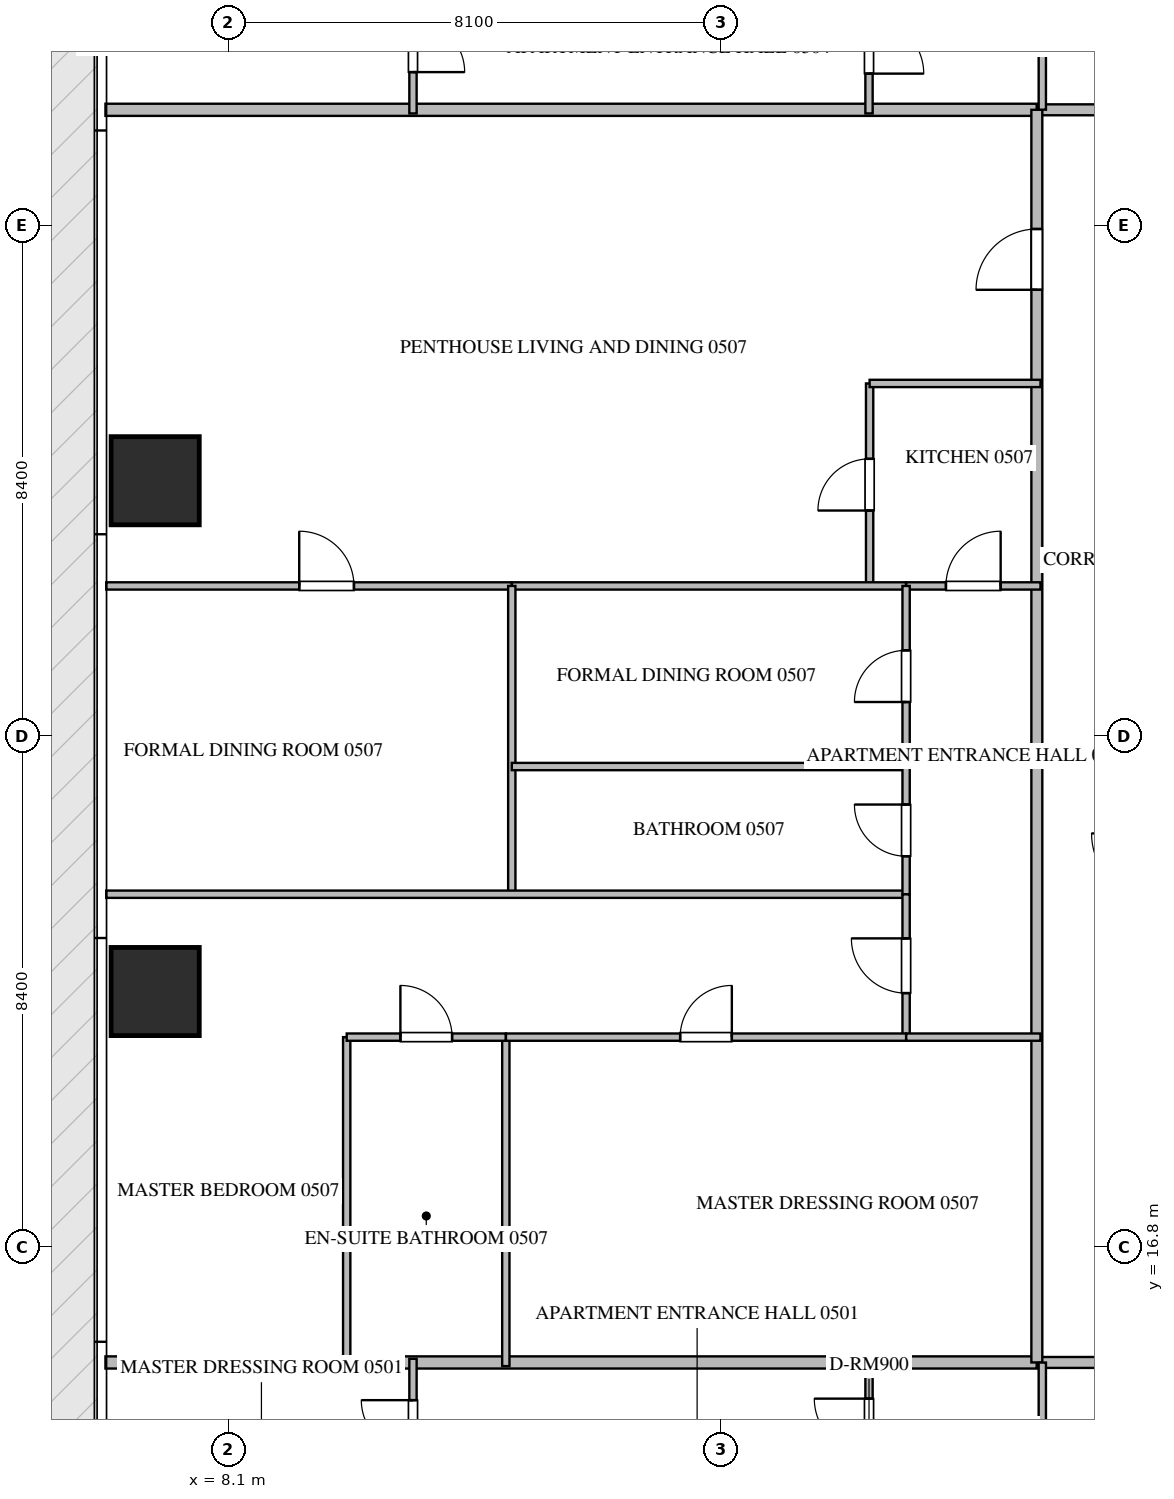
"""IFC4 building model, lengths in metres.
Left out: names, types, materials, properties, quantities, classifications, styles, units other than length and angle.
Written with IfcOpenShell. Run it as: python <this file> out.ifc"""

import sys

from ifc_helpers import new_model, si_unit, direction, frame, frame_2d, origin, origin_2d, place, context, subcontext, project, spatial, rectangle, extrude, source, transform, mapped, element, fill, save


model = new_model("IFC4")
c1 = context("Model", 3, precision=1e-05, world=origin(), true_north=direction((0.0, 1.0)))
c2 = subcontext(c1, "Body", "Model", "MODEL_VIEW")
j1 = project(units=[si_unit("LENGTHUNIT", "METRE"), si_unit("PLANEANGLEUNIT", "RADIAN")], contexts=[c1])
p1 = place(None, origin())
s1 = spatial("IfcSite", under=j1, at=p1, CompositionType="ELEMENT")
p2 = place(p1, origin())
s2 = spatial("IfcBuilding", under=s1, at=p2, CompositionType="ELEMENT")
p3 = place(p2, frame((0.0, 0.0, 26.7)))
s3 = spatial("IfcBuildingStorey", under=s2, at=p3, CompositionType="ELEMENT", Elevation=26.7)
m1 = source(origin(), c2, "Body", "SweptSolid", [
    extrude(rectangle(XDim=1.45, YDim=1.45, at=origin_2d()), origin(), (0.0, 0.0, 1.0), 3.93),
])
for number, where, z_axis, x_axis in (
    (1, (6.9, 21.0, -0.44), (0.0, 0.0, 1.0), (1.0, 0.0, 0.0)),
    (2, (6.9, 29.4, -0.44), (0.0, 0.0, 1.0), (1.0, 0.0, 0.0)),
):
    element("IfcColumn", number, at=place(p3, frame(where, z_axis=z_axis, x_axis=x_axis)), inside=s3, PredefinedType="COLUMN", context=c2, shape_type="MappedRepresentation", body=[
        mapped(m1, transform((0.0, 0.0, 0.0), scale=1.0)),
    ])
for number, where, z_axis, x_axis in (
    (3, (6.082, 14.9, 0.0), (0.0, 0.0, 1.0), (1.0, 0.0, 0.0)),
    (4, (6.082, 35.5, 0.0), (0.0, 0.0, 1.0), (1.0, 0.0, 0.0)),
):
    element("IfcWall", number, at=place(p3, frame(where, z_axis=z_axis, x_axis=x_axis)), inside=s3, PredefinedType="PARTITIONING", context=c2, shape_type="SweptSolid", body=[
        extrude(rectangle(XDim=15.318, YDim=0.2, at=frame_2d((7.659, 0.0))), origin(), (0.0, 0.0, 1.0), 3.49),
    ])
p4 = place(p3, frame((21.402, 14.9, 0.0), z_axis=(0.0, 0.0, 1.0), x_axis=(1.0, 0.0, 0.0)))
e5 = element("IfcWall", 5, at=p4, inside=s3, PredefinedType="PARTITIONING", context=c2, shape_type="SweptSolid", body=[
    extrude(rectangle(XDim=21.996, YDim=0.18, at=frame_2d((10.998, 0.0))), origin(), (0.0, 0.0, 1.0), 3.49),
])
p5 = place(p4, frame((2.1, 0.0, 0.0)))
e6 = element("IfcOpeningElement", 6, at=p5, cuts=e5, PredefinedType="OPENING", context=c2, shape_type="SweptSolid", body=[
    extrude(rectangle(XDim=1.0, YDim=2.15, at=frame_2d((0.5, 1.075))), frame((0.0, 0.1, 0.0), z_axis=(0.0, -1.0, 0.0), x_axis=(1.0, 0.0, 0.0)), (0.0, 0.0, 1.0), 0.2),
])
p6 = place(p4, frame((6.719, 0.0, 0.0)))
e7 = element("IfcOpeningElement", 7, at=p6, cuts=e5, PredefinedType="OPENING", context=c2, shape_type="SweptSolid", body=[
    extrude(rectangle(XDim=1.0, YDim=2.15, at=frame_2d((0.5, 1.075))), frame((0.0, 0.1, 0.0), z_axis=(0.0, -1.0, 0.0), x_axis=(1.0, 0.0, 0.0)), (0.0, 0.0, 1.0), 0.2),
])
p7 = place(p4, frame((18.896, 0.0, 0.0)))
e8 = element("IfcOpeningElement", 8, at=p7, cuts=e5, PredefinedType="OPENING", context=c2, shape_type="SweptSolid", body=[
    extrude(rectangle(XDim=1.0, YDim=2.15, at=frame_2d((0.5, 1.075))), frame((0.0, 0.1, 0.0), z_axis=(0.0, -1.0, 0.0), x_axis=(1.0, 0.0, 0.0)), (0.0, 0.0, 1.0), 0.2),
])
p8 = place(p3, frame((21.402, 35.5, 0.0), z_axis=(0.0, 0.0, 1.0), x_axis=(1.0, 0.0, 0.0)))
e9 = element("IfcWall", 9, at=p8, inside=s3, PredefinedType="PARTITIONING", context=c2, shape_type="SweptSolid", body=[
    extrude(rectangle(XDim=21.996, YDim=0.18, at=frame_2d((10.998, 0.0))), origin(), (0.0, 0.0, 1.0), 3.49),
])
p9 = place(p8, frame((2.1, 0.0, 0.0)))
e10 = element("IfcOpeningElement", 10, at=p9, cuts=e9, PredefinedType="OPENING", context=c2, shape_type="SweptSolid", body=[
    extrude(rectangle(XDim=1.0, YDim=2.15, at=frame_2d((0.5, 1.075))), frame((0.0, 0.1, 0.0), z_axis=(0.0, -1.0, 0.0), x_axis=(1.0, 0.0, 0.0)), (0.0, 0.0, 1.0), 0.2),
])
p10 = place(p8, frame((14.277, 0.0, 0.0)))
e11 = element("IfcOpeningElement", 11, at=p10, cuts=e9, PredefinedType="OPENING", context=c2, shape_type="SweptSolid", body=[
    extrude(rectangle(XDim=1.0, YDim=2.15, at=frame_2d((0.5, 1.075))), frame((0.0, 0.1, 0.0), z_axis=(0.0, -1.0, 0.0), x_axis=(1.0, 0.0, 0.0)), (0.0, 0.0, 1.0), 0.2),
])
p11 = place(p8, frame((18.896, 0.0, 0.0)))
e12 = element("IfcOpeningElement", 12, at=p11, cuts=e9, PredefinedType="OPENING", context=c2, shape_type="SweptSolid", body=[
    extrude(rectangle(XDim=1.0, YDim=2.15, at=frame_2d((0.5, 1.075))), frame((0.0, 0.1, 0.0), z_axis=(0.0, -1.0, 0.0), x_axis=(1.0, 0.0, 0.0)), (0.0, 0.0, 1.0), 0.2),
])
p12 = place(p3, frame((21.4, 14.9, 0.0), z_axis=(0.0, 0.0, 1.0), x_axis=(0.0, 1.0, 0.0)))
e13 = element("IfcWall", 13, at=p12, inside=s3, PredefinedType="PARTITIONING", context=c2, shape_type="SweptSolid", body=[
    extrude(rectangle(XDim=20.6, YDim=0.18, at=frame_2d((10.3, 0.0))), origin(), (0.0, 0.0, 1.0), 3.49),
])
p13 = place(p12, frame((17.64, 0.0, 0.0)))
e14 = element("IfcOpeningElement", 14, at=p13, cuts=e13, PredefinedType="OPENING", context=c2, shape_type="SweptSolid", body=[
    extrude(rectangle(XDim=1.0, YDim=2.15, at=frame_2d((0.5, 1.075))), frame((0.0, 0.1, 0.0), z_axis=(0.0, -1.0, 0.0), x_axis=(1.0, 0.0, 0.0)), (0.0, 0.0, 1.0), 0.2),
])
p14 = place(p3, frame((21.49, 12.15, 0.0), z_axis=(0.0, 0.0, 1.0), x_axis=(0.0, 1.0, 0.0)))
e15 = element("IfcWall", 15, at=p14, inside=s3, PredefinedType="PARTITIONING", context=c2, shape_type="SweptSolid", body=[
    extrude(rectangle(XDim=2.748, YDim=0.12, at=frame_2d((1.374, 0.0))), origin(), (0.0, 0.0, 1.0), 3.49),
])
p15 = place(p3, frame((18.64, 12.75, 0.0), z_axis=(0.0, 0.0, 1.0), x_axis=(0.0, 1.0, 0.0)))
e16 = element("IfcWall", 16, at=p15, inside=s3, PredefinedType="PARTITIONING", context=c2, shape_type="SweptSolid", body=[
    extrude(rectangle(XDim=2.21, YDim=0.12, at=frame_2d((1.105, 0.0))), origin(), (0.0, 0.0, 1.0), 3.49),
])
p16 = place(p15, frame((0.655, 0.0, 0.0)))
e17 = element("IfcOpeningElement", 17, at=p16, cuts=e16, PredefinedType="OPENING", context=c2, shape_type="SweptSolid", body=[
    extrude(rectangle(XDim=0.9, YDim=2.1, at=frame_2d((0.45, 1.05))), frame((0.0, 0.07, 0.0), z_axis=(0.0, -1.0, 0.0), x_axis=(1.0, 0.0, 0.0)), (0.0, 0.0, 1.0), 0.14),
])
p17 = place(p3, frame((11.14, 12.75, 0.0), z_axis=(0.0, 0.0, 1.0), x_axis=(0.0, 1.0, 0.0)))
e18 = element("IfcWall", 18, at=p17, inside=s3, PredefinedType="PARTITIONING", context=c2, shape_type="SweptSolid", body=[
    extrude(rectangle(XDim=2.21, YDim=0.12, at=frame_2d((1.105, 0.0))), origin(), (0.0, 0.0, 1.0), 3.49),
])
p18 = place(p17, frame((0.68, 0.0, 0.0)))
e19 = element("IfcOpeningElement", 19, at=p18, cuts=e18, PredefinedType="OPENING", context=c2, shape_type="SweptSolid", body=[
    extrude(rectangle(XDim=0.85, YDim=2.1, at=frame_2d((0.425, 1.05))), frame((0.0, 0.07, 0.0), z_axis=(0.0, -1.0, 0.0), x_axis=(1.0, 0.0, 0.0)), (0.0, 0.0, 1.0), 0.14),
])
p19 = place(p3, frame((21.49, 38.25, 0.0), z_axis=(0.0, 0.0, 1.0), x_axis=(0.0, -1.0, 0.0)))
e20 = element("IfcWall", 20, at=p19, inside=s3, PredefinedType="PARTITIONING", context=c2, shape_type="SweptSolid", body=[
    extrude(rectangle(XDim=2.748, YDim=0.12, at=frame_2d((1.374, 0.0))), origin(), (0.0, 0.0, 1.0), 3.49),
])
p20 = place(p3, frame((18.64, 37.65, 0.0), z_axis=(0.0, 0.0, 1.0), x_axis=(0.0, -1.0, 0.0)))
e21 = element("IfcWall", 21, at=p20, inside=s3, PredefinedType="PARTITIONING", context=c2, shape_type="SweptSolid", body=[
    extrude(rectangle(XDim=2.21, YDim=0.12, at=frame_2d((1.105, 0.0))), origin(), (0.0, 0.0, 1.0), 3.49),
])
p21 = place(p20, frame((0.655, 0.0, 0.0)))
e22 = element("IfcOpeningElement", 22, at=p21, cuts=e21, PredefinedType="OPENING", context=c2, shape_type="SweptSolid", body=[
    extrude(rectangle(XDim=0.9, YDim=2.1, at=frame_2d((0.45, 1.05))), frame((0.0, 0.07, 0.0), z_axis=(0.0, -1.0, 0.0), x_axis=(1.0, 0.0, 0.0)), (0.0, 0.0, 1.0), 0.14),
])
p22 = place(p3, frame((11.14, 37.65, 0.0), z_axis=(0.0, 0.0, 1.0), x_axis=(0.0, -1.0, 0.0)))
e23 = element("IfcWall", 23, at=p22, inside=s3, PredefinedType="PARTITIONING", context=c2, shape_type="SweptSolid", body=[
    extrude(rectangle(XDim=2.21, YDim=0.12, at=frame_2d((1.105, 0.0))), origin(), (0.0, 0.0, 1.0), 3.49),
])
p23 = place(p22, frame((0.68, 0.0, 0.0)))
e24 = element("IfcOpeningElement", 24, at=p23, cuts=e23, PredefinedType="OPENING", context=c2, shape_type="SweptSolid", body=[
    extrude(rectangle(XDim=0.85, YDim=2.1, at=frame_2d((0.425, 1.05))), frame((0.0, 0.07, 0.0), z_axis=(0.0, -1.0, 0.0), x_axis=(1.0, 0.0, 0.0)), (0.0, 0.0, 1.0), 0.14),
])
p24 = place(p3, frame((18.65, 27.67, 0.0), z_axis=(0.0, 0.0, 1.0), x_axis=(0.0, 1.0, 0.0)))
e25 = element("IfcWall", 25, at=p24, inside=s3, PredefinedType="PARTITIONING", context=c2, shape_type="SweptSolid", body=[
    extrude(rectangle(XDim=3.33, YDim=0.12, at=frame_2d((1.665, 0.0))), origin(), (0.0, 0.0, 1.0), 3.49),
])
p25 = place(p24, frame((1.24, 0.0, 0.0)))
e26 = element("IfcOpeningElement", 26, at=p25, cuts=e25, PredefinedType="OPENING", context=c2, shape_type="SweptSolid", body=[
    extrude(rectangle(XDim=0.85, YDim=2.1, at=frame_2d((0.425, 1.05))), frame((0.0, 0.07, 0.0), z_axis=(0.0, -1.0, 0.0), x_axis=(1.0, 0.0, 0.0)), (0.0, 0.0, 1.0), 0.14),
])
p26 = place(p3, frame((18.65, 31.0, 0.0), z_axis=(0.0, 0.0, 1.0), x_axis=(1.0, 0.0, 0.0)))
e27 = element("IfcWall", 27, at=p26, inside=s3, PredefinedType="PARTITIONING", context=c2, shape_type="SweptSolid", body=[
    extrude(rectangle(XDim=2.81, YDim=0.12, at=frame_2d((1.405, 0.0))), origin(), (0.0, 0.0, 1.0), 3.49),
])
p27 = place(p3, frame((19.25, 27.67, 0.0), z_axis=(0.0, 0.0, 1.0), x_axis=(1.0, 0.0, 0.0)))
e28 = element("IfcWall", 28, at=p27, inside=s3, PredefinedType="PARTITIONING", context=c2, shape_type="SweptSolid", body=[
    extrude(rectangle(XDim=2.21, YDim=0.12, at=frame_2d((1.105, 0.0))), origin(), (0.0, 0.0, 1.0), 3.49),
])
p28 = place(p27, frame((0.655, 0.0, 0.0)))
e29 = element("IfcOpeningElement", 29, at=p28, cuts=e28, PredefinedType="OPENING", context=c2, shape_type="SweptSolid", body=[
    extrude(rectangle(XDim=0.9, YDim=2.1, at=frame_2d((0.45, 1.05))), frame((0.0, 0.07, 0.0), z_axis=(0.0, -1.0, 0.0), x_axis=(1.0, 0.0, 0.0)), (0.0, 0.0, 1.0), 0.14),
])
p29 = place(p3, frame((6.095, 27.67, 0.0), z_axis=(0.0, 0.0, 1.0), x_axis=(1.0, 0.0, 0.0)))
e30 = element("IfcWall", 30, at=p29, inside=s3, PredefinedType="PARTITIONING", context=c2, shape_type="SweptSolid", body=[
    extrude(rectangle(XDim=6.67, YDim=0.12, at=frame_2d((3.335, 0.0))), origin(), (0.0, 0.0, 1.0), 3.49),
])
p30 = place(p29, frame((3.174, 0.0, 0.0)))
e31 = element("IfcOpeningElement", 31, at=p30, cuts=e30, PredefinedType="OPENING", context=c2, shape_type="SweptSolid", body=[
    extrude(rectangle(XDim=0.9, YDim=2.1, at=frame_2d((0.45, 1.05))), frame((0.0, 0.07, 0.0), z_axis=(0.0, -1.0, 0.0), x_axis=(1.0, 0.0, 0.0)), (0.0, 0.0, 1.0), 0.14),
])
p31 = place(p3, frame((12.767, 27.67, 0.0), z_axis=(0.0, 0.0, 1.0), x_axis=(1.0, 0.0, 0.0)))
e32 = element("IfcWall", 32, at=p31, inside=s3, PredefinedType="PARTITIONING", context=c2, shape_type="SweptSolid", body=[
    extrude(rectangle(XDim=6.481, YDim=0.12, at=frame_2d((3.24, 0.0))), origin(), (0.0, 0.0, 1.0), 3.49),
])
p32 = place(p3, frame((12.765, 22.6, 0.0), z_axis=(0.0, 0.0, 1.0), x_axis=(0.0, 1.0, 0.0)))
e33 = element("IfcWall", 33, at=p32, inside=s3, PredefinedType="PARTITIONING", context=c2, shape_type="SweptSolid", body=[
    extrude(rectangle(XDim=5.07, YDim=0.12, at=frame_2d((2.535, 0.0))), origin(), (0.0, 0.0, 1.0), 3.49),
])
p33 = place(p3, frame((6.095, 22.6, 0.0), z_axis=(0.0, 0.0, 1.0), x_axis=(1.0, 0.0, 0.0)))
e34 = element("IfcWall", 34, at=p33, inside=s3, PredefinedType="PARTITIONING", context=c2, shape_type="SweptSolid", body=[
    extrude(rectangle(XDim=13.155, YDim=0.12, at=frame_2d((6.578, 0.0))), origin(), (0.0, 0.0, 1.0), 3.49),
])
p34 = place(p3, frame((12.765, 24.7, 0.0), z_axis=(0.0, 0.0, 1.0), x_axis=(1.0, 0.0, 0.0)))
e35 = element("IfcWall", 35, at=p34, inside=s3, PredefinedType="PARTITIONING", context=c2, shape_type="SweptSolid", body=[
    extrude(rectangle(XDim=6.485, YDim=0.12, at=frame_2d((3.243, 0.0))), origin(), (0.0, 0.0, 1.0), 3.49),
])
p35 = place(p3, frame((19.25, 22.6, 0.0), z_axis=(0.0, 0.0, 1.0), x_axis=(0.0, 1.0, 0.0)))
e36 = element("IfcWall", 36, at=p35, inside=s3, PredefinedType="PARTITIONING", context=c2, shape_type="SweptSolid", body=[
    extrude(rectangle(XDim=2.1, YDim=0.12, at=frame_2d((1.05, 0.0))), origin(), (0.0, 0.0, 1.0), 3.49),
])
p36 = place(p35, frame((0.625, 0.0, 0.0)))
e37 = element("IfcOpeningElement", 37, at=p36, cuts=e36, PredefinedType="OPENING", context=c2, shape_type="SweptSolid", body=[
    extrude(rectangle(XDim=0.85, YDim=2.1, at=frame_2d((0.425, 1.05))), frame((0.0, 0.07, 0.0), z_axis=(0.0, -1.0, 0.0), x_axis=(1.0, 0.0, 0.0)), (0.0, 0.0, 1.0), 0.14),
])
p37 = place(p3, frame((19.25, 24.702, 0.0), z_axis=(0.0, 0.0, 1.0), x_axis=(0.0, 1.0, 0.0)))
e38 = element("IfcWall", 38, at=p37, inside=s3, PredefinedType="PARTITIONING", context=c2, shape_type="SweptSolid", body=[
    extrude(rectangle(XDim=2.968, YDim=0.12, at=frame_2d((1.484, 0.0))), origin(), (0.0, 0.0, 1.0), 3.49),
])
p38 = place(p37, frame((1.059, 0.0, 0.0)))
e39 = element("IfcOpeningElement", 39, at=p38, cuts=e38, PredefinedType="OPENING", context=c2, shape_type="SweptSolid", body=[
    extrude(rectangle(XDim=0.85, YDim=2.1, at=frame_2d((0.425, 1.05))), frame((0.0, 0.07, 0.0), z_axis=(0.0, -1.0, 0.0), x_axis=(1.0, 0.0, 0.0)), (0.0, 0.0, 1.0), 0.14),
])
p39 = place(p3, frame((19.25, 20.25, 0.0), z_axis=(0.0, 0.0, 1.0), x_axis=(0.0, 1.0, 0.0)))
e40 = element("IfcWall", 40, at=p39, inside=s3, PredefinedType="PARTITIONING", context=c2, shape_type="SweptSolid", body=[
    extrude(rectangle(XDim=2.348, YDim=0.12, at=frame_2d((1.174, 0.0))), origin(), (0.0, 0.0, 1.0), 3.49),
])
p40 = place(p39, frame((0.724, 0.0, 0.0)))
e41 = element("IfcOpeningElement", 41, at=p40, cuts=e40, PredefinedType="OPENING", context=c2, shape_type="SweptSolid", body=[
    extrude(rectangle(XDim=0.9, YDim=2.1, at=frame_2d((0.45, 1.05))), frame((0.0, 0.07, 0.0), z_axis=(0.0, -1.0, 0.0), x_axis=(1.0, 0.0, 0.0)), (0.0, 0.0, 1.0), 0.14),
])
for number, where, z_axis, x_axis in (
    (42, (10.05, 14.84, 0.0), (0.0, 0.0, 1.0), (0.0, 1.0, 0.0)),
    (43, (12.667, 14.84, 0.0), (0.0, 0.0, 1.0), (0.0, 1.0, 0.0)),
):
    element("IfcWall", number, at=place(p3, frame(where, z_axis=z_axis, x_axis=x_axis)), inside=s3, PredefinedType="PARTITIONING", context=c2, shape_type="SweptSolid", body=[
        extrude(rectangle(XDim=5.41, YDim=0.12, at=frame_2d((2.705, 0.0))), origin(), (0.0, 0.0, 1.0), 3.49),
    ])
p41 = place(p3, frame((10.05, 20.25, 0.0), z_axis=(0.0, 0.0, 1.0), x_axis=(1.0, 0.0, 0.0)))
e44 = element("IfcWall", 44, at=p41, inside=s3, PredefinedType="PARTITIONING", context=c2, shape_type="SweptSolid", body=[
    extrude(rectangle(XDim=2.617, YDim=0.12, at=frame_2d((1.309, 0.0))), origin(), (0.0, 0.0, 1.0), 3.49),
])
p42 = place(p41, frame((0.883, 0.0, 0.0)))
e45 = element("IfcOpeningElement", 45, at=p42, cuts=e44, PredefinedType="OPENING", context=c2, shape_type="SweptSolid", body=[
    extrude(rectangle(XDim=0.85, YDim=2.1, at=frame_2d((0.425, 1.05))), frame((0.0, 0.07, 0.0), z_axis=(0.0, -1.0, 0.0), x_axis=(1.0, 0.0, 0.0)), (0.0, 0.0, 1.0), 0.14),
])
p43 = place(p3, frame((12.669, 20.25, 0.0), z_axis=(0.0, 0.0, 1.0), x_axis=(1.0, 0.0, 0.0)))
e46 = element("IfcWall", 46, at=p43, inside=s3, PredefinedType="PARTITIONING", context=c2, shape_type="SweptSolid", body=[
    extrude(rectangle(XDim=6.581, YDim=0.12, at=frame_2d((3.291, 0.0))), origin(), (0.0, 0.0, 1.0), 3.49),
])
p44 = place(p43, frame((2.865, 0.0, 0.0)))
e47 = element("IfcOpeningElement", 47, at=p44, cuts=e46, PredefinedType="OPENING", context=c2, shape_type="SweptSolid", body=[
    extrude(rectangle(XDim=0.85, YDim=2.1, at=frame_2d((0.425, 1.05))), frame((0.0, 0.07, 0.0), z_axis=(0.0, -1.0, 0.0), x_axis=(1.0, 0.0, 0.0)), (0.0, 0.0, 1.0), 0.14),
])
p45 = place(p3, frame((19.252, 20.25, 0.0), z_axis=(0.0, 0.0, 1.0), x_axis=(1.0, 0.0, 0.0)))
e48 = element("IfcWall", 48, at=p45, inside=s3, PredefinedType="PARTITIONING", context=c2, shape_type="SweptSolid", body=[
    extrude(rectangle(XDim=2.208, YDim=0.12, at=frame_2d((1.104, 0.0))), origin(), (0.0, 0.0, 1.0), 3.49),
])
m2 = source(origin(), c2, "Body", "SweptSolid", [
    extrude(rectangle(XDim=1.0, YDim=2.15, at=frame_2d((0.5, 1.075))), frame((0.0, 0.025, 0.0), z_axis=(0.0, -1.0, 0.0), x_axis=(1.0, 0.0, 0.0)), (0.0, 0.0, 1.0), 0.05),
])
p46 = place(p13, origin())
e49 = element("IfcDoor", 49, at=p46, inside=s3, OperationType="SINGLE_SWING_LEFT", PredefinedType="DOOR", context=c2, shape_type="MappedRepresentation", body=[
    mapped(m2, transform((0.0, 0.0, 0.0), scale=1.0)),
])
fill(e14, e49)
m3 = source(origin(), c2, "Body", "SweptSolid", [
    extrude(rectangle(XDim=0.9, YDim=2.1, at=frame_2d((0.45, 1.05))), frame((0.0, 0.025, 0.0), z_axis=(0.0, -1.0, 0.0), x_axis=(1.0, 0.0, 0.0)), (0.0, 0.0, 1.0), 0.05),
])
p47 = place(p16, origin())
e50 = element("IfcDoor", 50, at=p47, inside=s3, OperationType="SINGLE_SWING_RIGHT", PredefinedType="DOOR", context=c2, shape_type="MappedRepresentation", body=[
    mapped(m3, transform((0.0, 0.0, 0.0), scale=1.0)),
])
fill(e17, e50)
m4 = source(origin(), c2, "Body", "SweptSolid", [
    extrude(rectangle(XDim=0.85, YDim=2.1, at=frame_2d((0.425, 1.05))), frame((0.0, 0.025, 0.0), z_axis=(0.0, -1.0, 0.0), x_axis=(1.0, 0.0, 0.0)), (0.0, 0.0, 1.0), 0.05),
])
p48 = place(p18, origin())
e51 = element("IfcDoor", 51, at=p48, inside=s3, OperationType="SINGLE_SWING_RIGHT", PredefinedType="DOOR", context=c2, shape_type="MappedRepresentation", body=[
    mapped(m4, transform((0.0, 0.0, 0.0), scale=1.0)),
])
fill(e19, e51)
p49 = place(p21, origin())
e52 = element("IfcDoor", 52, at=p49, inside=s3, OperationType="SINGLE_SWING_RIGHT", PredefinedType="DOOR", context=c2, shape_type="MappedRepresentation", body=[
    mapped(m3, transform((0.0, 0.0, 0.0), scale=1.0)),
])
fill(e22, e52)
p50 = place(p23, origin())
e53 = element("IfcDoor", 53, at=p50, inside=s3, OperationType="SINGLE_SWING_RIGHT", PredefinedType="DOOR", context=c2, shape_type="MappedRepresentation", body=[
    mapped(m4, transform((0.0, 0.0, 0.0), scale=1.0)),
])
fill(e24, e53)
p51 = place(p25, origin())
e54 = element("IfcDoor", 54, at=p51, inside=s3, OperationType="SINGLE_SWING_LEFT", PredefinedType="DOOR", context=c2, shape_type="MappedRepresentation", body=[
    mapped(m4, transform((0.0, 0.0, 0.0), scale=1.0)),
])
fill(e26, e54)
p52 = place(p28, origin())
e55 = element("IfcDoor", 55, at=p52, inside=s3, OperationType="SINGLE_SWING_RIGHT", PredefinedType="DOOR", context=c2, shape_type="MappedRepresentation", body=[
    mapped(m3, transform((0.0, 0.0, 0.0), scale=1.0)),
])
fill(e29, e55)
p53 = place(p30, origin())
e56 = element("IfcDoor", 56, at=p53, inside=s3, OperationType="SINGLE_SWING_LEFT", PredefinedType="DOOR", context=c2, shape_type="MappedRepresentation", body=[
    mapped(m3, transform((0.0, 0.0, 0.0), scale=1.0)),
])
fill(e31, e56)
p54 = place(p36, origin())
e57 = element("IfcDoor", 57, at=p54, inside=s3, OperationType="SINGLE_SWING_RIGHT", PredefinedType="DOOR", context=c2, shape_type="MappedRepresentation", body=[
    mapped(m4, transform((0.0, 0.0, 0.0), scale=1.0)),
])
fill(e37, e57)
p55 = place(p38, origin())
e58 = element("IfcDoor", 58, at=p55, inside=s3, OperationType="SINGLE_SWING_LEFT", PredefinedType="DOOR", context=c2, shape_type="MappedRepresentation", body=[
    mapped(m4, transform((0.0, 0.0, 0.0), scale=1.0)),
])
fill(e39, e58)
p56 = place(p40, origin())
e59 = element("IfcDoor", 59, at=p56, inside=s3, OperationType="SINGLE_SWING_RIGHT", PredefinedType="DOOR", context=c2, shape_type="MappedRepresentation", body=[
    mapped(m3, transform((0.0, 0.0, 0.0), scale=1.0)),
])
fill(e41, e59)
p57 = place(p42, origin())
e60 = element("IfcDoor", 60, at=p57, inside=s3, OperationType="SINGLE_SWING_LEFT", PredefinedType="DOOR", context=c2, shape_type="MappedRepresentation", body=[
    mapped(m4, transform((0.0, 0.0, 0.0), scale=1.0)),
])
fill(e45, e60)
p58 = place(p44, origin())
e61 = element("IfcDoor", 61, at=p58, inside=s3, OperationType="SINGLE_SWING_RIGHT", PredefinedType="DOOR", context=c2, shape_type="MappedRepresentation", body=[
    mapped(m4, transform((0.0, 0.0, 0.0), scale=1.0)),
])
fill(e47, e61)
save(model, sys.argv[1])
